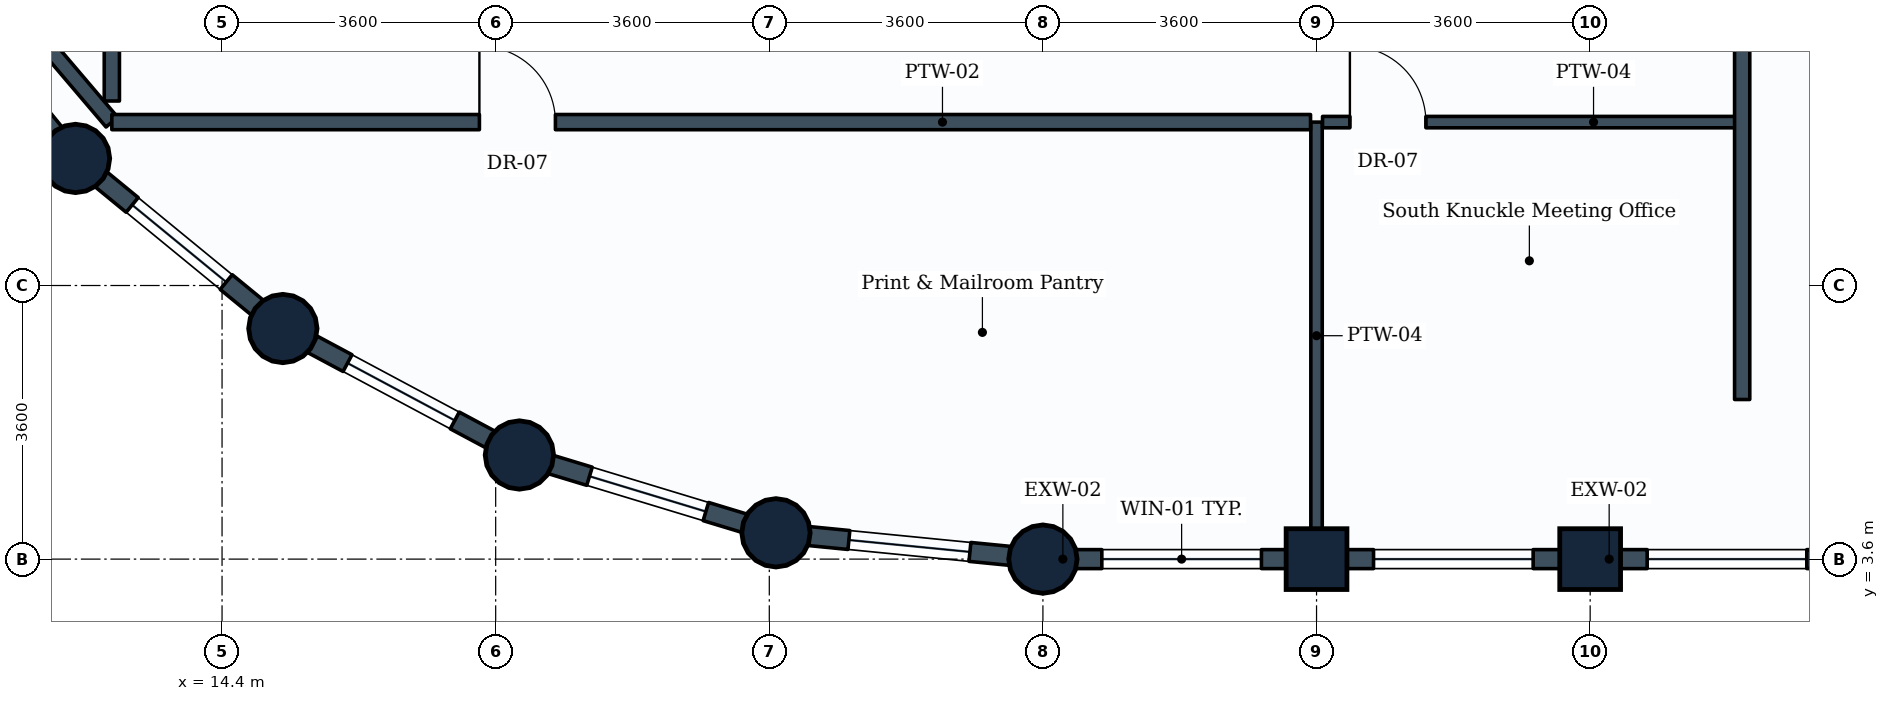
"""IFC4 building model, lengths in metres.
Left out: names, types, materials, properties, quantities, classifications, styles, units other than length and angle.
Written with IfcOpenShell. Run it as: python <this file> out.ifc"""

import sys

from ifc_helpers import new_model, si_unit, direction, frame, frame_2d, origin, origin_2d, place, context, subcontext, project, spatial, rectangle, circle, extrude, element, fill, save


model = new_model("IFC4")
c1 = context("Model", 3, precision=1e-05, world=origin(), true_north=direction((0.0, 1.0)))
c2 = subcontext(c1, "Body", "Model", "MODEL_VIEW")
j1 = project(units=[si_unit("LENGTHUNIT", "METRE"), si_unit("PLANEANGLEUNIT", "RADIAN")], contexts=[c1])
p1 = place(None, origin())
s1 = spatial("IfcSite", under=j1, at=p1, CompositionType="ELEMENT")
p2 = place(p1, origin())
s2 = spatial("IfcBuilding", under=s1, at=p2, CompositionType="ELEMENT")
p3 = place(p2, frame((0.0, 0.0, 270.2)))
s3 = spatial("IfcBuildingStorey", under=s2, at=p3, CompositionType="ELEMENT", Elevation=270.2)
for number, where, z_axis, x_axis in (
    (1, (12.472, 8.872, 0.0), (0.0, 0.0, 1.0), (1.0, 0.0, 0.0)),
    (2, (15.2, 6.634, 0.0), (0.0, 0.0, 1.0), (1.0, 0.0, 0.0)),
    (3, (18.312, 4.97, 0.0), (0.0, 0.0, 1.0), (1.0, 0.0, 0.0)),
    (4, (21.688, 3.946, 0.0), (0.0, 0.0, 1.0), (1.0, 0.0, 0.0)),
    (5, (25.2, 3.6, 0.0), (0.0, 0.0, 1.0), (1.0, 0.0, 0.0)),
):
    element("IfcColumn", number, at=place(p3, frame(where, z_axis=z_axis, x_axis=x_axis)), inside=s3, PredefinedType="COLUMN", context=c2, shape_type="SweptSolid", body=[
        extrude(circle(Radius=0.45, at=origin_2d()), origin(), (0.0, 0.0, 1.0), 3.6),
    ])
for number, where, z_axis, x_axis in (
    (6, (28.8, 3.6, 0.0), (0.0, 0.0, 1.0), (1.0, 0.0, 0.0)),
    (7, (32.4, 3.6, 0.0), (0.0, 0.0, 1.0), (1.0, 0.0, 0.0)),
):
    element("IfcColumn", number, at=place(p3, frame(where, z_axis=z_axis, x_axis=x_axis)), inside=s3, PredefinedType="COLUMN", context=c2, shape_type="SweptSolid", body=[
        extrude(rectangle(XDim=0.8, YDim=0.8, at=origin_2d()), origin(), (0.0, 0.0, 1.0), 3.6),
    ])
p4 = place(p3, frame((28.8, 3.6, 0.0), z_axis=(0.0, 0.0, 1.0), x_axis=(-1.0, 0.0, 0.0)))
e8 = element("IfcWall", 8, at=p4, inside=s3, PredefinedType="STANDARD", context=c2, shape_type="SweptSolid", body=[
    extrude(rectangle(XDim=3.6, YDim=0.25, at=frame_2d((1.8, 0.0))), origin(), (0.0, 0.0, 1.0), 2.83),
])
p5 = place(p4, frame((0.725, 0.0, 0.85)))
e9 = element("IfcOpeningElement", 9, at=p5, cuts=e8, PredefinedType="OPENING", context=c2, shape_type="SweptSolid", body=[
    extrude(rectangle(XDim=2.1, YDim=1.35, at=frame_2d((1.05, 0.675))), frame((0.0, 0.135, 0.0), z_axis=(0.0, -1.0, 0.0), x_axis=(1.0, 0.0, 0.0)), (0.0, 0.0, 1.0), 0.27),
])
p6 = place(p3, frame((32.4, 3.6, 0.0), z_axis=(0.0, 0.0, 1.0), x_axis=(-1.0, 0.0, 0.0)))
e10 = element("IfcWall", 10, at=p6, inside=s3, PredefinedType="STANDARD", context=c2, shape_type="SweptSolid", body=[
    extrude(rectangle(XDim=3.6, YDim=0.25, at=frame_2d((1.8, 0.0))), origin(), (0.0, 0.0, 1.0), 2.83),
])
p7 = place(p6, frame((0.75, 0.0, 0.85)))
e11 = element("IfcOpeningElement", 11, at=p7, cuts=e10, PredefinedType="OPENING", context=c2, shape_type="SweptSolid", body=[
    extrude(rectangle(XDim=2.1, YDim=1.35, at=frame_2d((1.05, 0.675))), frame((0.0, 0.135, 0.0), z_axis=(0.0, -1.0, 0.0), x_axis=(1.0, 0.0, 0.0)), (0.0, 0.0, 1.0), 0.27),
])
p8 = place(p3, frame((36.0, 3.6, 0.0), z_axis=(0.0, 0.0, 1.0), x_axis=(-1.0, 0.0, 0.0)))
e12 = element("IfcWall", 12, at=p8, inside=s3, PredefinedType="STANDARD", context=c2, shape_type="SweptSolid", body=[
    extrude(rectangle(XDim=3.6, YDim=0.25, at=frame_2d((1.8, 0.0))), origin(), (0.0, 0.0, 1.0), 2.83),
])
p9 = place(p8, frame((0.75, 0.0, 0.85)))
e13 = element("IfcOpeningElement", 13, at=p9, cuts=e12, PredefinedType="OPENING", context=c2, shape_type="SweptSolid", body=[
    extrude(rectangle(XDim=2.1, YDim=1.35, at=frame_2d((1.05, 0.675))), frame((0.0, 0.135, 0.0), z_axis=(0.0, -1.0, 0.0), x_axis=(1.0, 0.0, 0.0)), (0.0, 0.0, 1.0), 0.27),
])
p10 = place(p3, frame((12.472, 8.872, 0.0), z_axis=(0.0, 0.0, 1.0), x_axis=(-0.634258295121, 0.773121216285, 0.0)))
e14 = element("IfcWall", 14, at=p10, inside=s3, PredefinedType="STANDARD", context=c2, shape_type="SweptSolid", body=[
    extrude(rectangle(XDim=3.529, YDim=0.25, at=frame_2d((1.764, 0.0))), origin(), (0.0, 0.0, 1.0), 2.83),
])
p11 = place(p10, frame((0.964, 0.0, 0.85)))
e15 = element("IfcOpeningElement", 15, at=p11, cuts=e14, PredefinedType="OPENING", context=c2, shape_type="SweptSolid", body=[
    extrude(rectangle(XDim=1.6, YDim=1.35, at=frame_2d((0.8, 0.675))), frame((0.0, 0.135, 0.0), z_axis=(0.0, -1.0, 0.0), x_axis=(1.0, 0.0, 0.0)), (0.0, 0.0, 1.0), 0.27),
])
p12 = place(p3, frame((15.2, 6.634, 0.0), z_axis=(0.0, 0.0, 1.0), x_axis=(-0.773121216285, 0.634258295121, 0.0)))
e16 = element("IfcWall", 16, at=p12, inside=s3, PredefinedType="STANDARD", context=c2, shape_type="SweptSolid", body=[
    extrude(rectangle(XDim=3.529, YDim=0.25, at=frame_2d((1.764, 0.0))), origin(), (0.0, 0.0, 1.0), 2.83),
])
p13 = place(p12, frame((0.964, 0.0, 0.85)))
e17 = element("IfcOpeningElement", 17, at=p13, cuts=e16, PredefinedType="OPENING", context=c2, shape_type="SweptSolid", body=[
    extrude(rectangle(XDim=1.6, YDim=1.35, at=frame_2d((0.8, 0.675))), frame((0.0, 0.135, 0.0), z_axis=(0.0, -1.0, 0.0), x_axis=(1.0, 0.0, 0.0)), (0.0, 0.0, 1.0), 0.27),
])
p14 = place(p3, frame((18.312, 4.97, 0.0), z_axis=(0.0, 0.0, 1.0), x_axis=(-0.881846862014, 0.471535907389, 0.0)))
e18 = element("IfcWall", 18, at=p14, inside=s3, PredefinedType="STANDARD", context=c2, shape_type="SweptSolid", body=[
    extrude(rectangle(XDim=3.529, YDim=0.25, at=frame_2d((1.765, 0.0))), origin(), (0.0, 0.0, 1.0), 2.83),
])
p15 = place(p14, frame((0.964, 0.0, 0.85)))
e19 = element("IfcOpeningElement", 19, at=p15, cuts=e18, PredefinedType="OPENING", context=c2, shape_type="SweptSolid", body=[
    extrude(rectangle(XDim=1.6, YDim=1.35, at=frame_2d((0.8, 0.675))), frame((0.0, 0.135, 0.0), z_axis=(0.0, -1.0, 0.0), x_axis=(1.0, 0.0, 0.0)), (0.0, 0.0, 1.0), 0.27),
])
p16 = place(p3, frame((21.688, 3.946, 0.0), z_axis=(0.0, 0.0, 1.0), x_axis=(-0.956953367403, 0.290241714123, 0.0)))
e20 = element("IfcWall", 20, at=p16, inside=s3, PredefinedType="STANDARD", context=c2, shape_type="SweptSolid", body=[
    extrude(rectangle(XDim=3.528, YDim=0.25, at=frame_2d((1.764, 0.0))), origin(), (0.0, 0.0, 1.0), 2.83),
])
p17 = place(p16, frame((0.964, 0.0, 0.85)))
e21 = element("IfcOpeningElement", 21, at=p17, cuts=e20, PredefinedType="OPENING", context=c2, shape_type="SweptSolid", body=[
    extrude(rectangle(XDim=1.6, YDim=1.35, at=frame_2d((0.8, 0.675))), frame((0.0, 0.135, 0.0), z_axis=(0.0, -1.0, 0.0), x_axis=(1.0, 0.0, 0.0)), (0.0, 0.0, 1.0), 0.27),
])
p18 = place(p3, frame((25.2, 3.6, 0.0), z_axis=(0.0, 0.0, 1.0), x_axis=(-0.995183369056, 0.098030923459, 0.0)))
e22 = element("IfcWall", 22, at=p18, inside=s3, PredefinedType="STANDARD", context=c2, shape_type="SweptSolid", body=[
    extrude(rectangle(XDim=3.529, YDim=0.25, at=frame_2d((1.765, 0.0))), origin(), (0.0, 0.0, 1.0), 2.83),
])
p19 = place(p18, frame((0.965, 0.0, 0.85)))
e23 = element("IfcOpeningElement", 23, at=p19, cuts=e22, PredefinedType="OPENING", context=c2, shape_type="SweptSolid", body=[
    extrude(rectangle(XDim=1.6, YDim=1.35, at=frame_2d((0.8, 0.675))), frame((0.0, 0.135, 0.0), z_axis=(0.0, -1.0, 0.0), x_axis=(1.0, 0.0, 0.0)), (0.0, 0.0, 1.0), 0.27),
])
p20 = place(p3, frame((28.8, 9.35, 0.0), z_axis=(0.0, 0.0, 1.0), x_axis=(0.0, -1.0, 0.0)))
e24 = element("IfcWall", 24, at=p20, inside=s3, PredefinedType="PARTITIONING", context=c2, shape_type="SweptSolid", body=[
    extrude(rectangle(XDim=5.621, YDim=0.15, at=frame_2d((2.811, 0.0))), origin(), (0.0, 0.0, 1.0), 3.335),
])
p21 = place(p3, frame((12.95, 9.35, 0.0), z_axis=(0.0, 0.0, 1.0), x_axis=(-0.648016103597, 0.761626633908, 0.0)))
e25 = element("IfcWall", 25, at=p21, inside=s3, PredefinedType="PARTITIONING", context=c2, shape_type="SweptSolid", body=[
    extrude(rectangle(XDim=5.319, YDim=0.2, at=frame_2d((2.659, 0.0))), origin(), (0.0, 0.0, 1.0), 2.83),
])
p22 = place(p3, frame((12.95, 9.628, 0.0), z_axis=(0.0, 0.0, 1.0), x_axis=(0.0, 1.0, 0.0)))
e26 = element("IfcWall", 26, at=p22, inside=s3, PredefinedType="PARTITIONING", context=c2, shape_type="SweptSolid", body=[
    extrude(rectangle(XDim=6.868, YDim=0.2, at=frame_2d((3.434, 0.0))), origin(), (0.0, 0.0, 1.0), 3.03),
])
p23 = place(p22, frame((3.953, 0.0, 0.0)))
e27 = element("IfcOpeningElement", 27, at=p23, cuts=e26, PredefinedType="OPENING", context=c2, shape_type="SweptSolid", body=[
    extrude(rectangle(XDim=1.0, YDim=2.1, at=frame_2d((0.5, 1.05))), frame((0.0, 0.11, 0.0), z_axis=(0.0, -1.0, 0.0), x_axis=(1.0, 0.0, 0.0)), (0.0, 0.0, 1.0), 0.22),
])
p24 = place(p3, frame((12.95, 9.35, 0.0), z_axis=(0.0, 0.0, 1.0), x_axis=(1.0, 0.0, 0.0)))
e28 = element("IfcWall", 28, at=p24, inside=s3, PredefinedType="PARTITIONING", context=c2, shape_type="SweptSolid", body=[
    extrude(rectangle(XDim=15.771, YDim=0.2, at=frame_2d((7.885, 0.0))), origin(), (0.0, 0.0, 1.0), 3.02),
])
p25 = place(p24, frame((4.836, 0.0, 0.0)))
e29 = element("IfcOpeningElement", 29, at=p25, cuts=e28, PredefinedType="OPENING", context=c2, shape_type="SweptSolid", body=[
    extrude(rectangle(XDim=1.0, YDim=2.1, at=frame_2d((0.5, 1.05))), frame((0.0, 0.11, 0.0), z_axis=(0.0, -1.0, 0.0), x_axis=(1.0, 0.0, 0.0)), (0.0, 0.0, 1.0), 0.22),
])
p26 = place(p3, frame((28.879, 9.35, 0.0), z_axis=(0.0, 0.0, 1.0), x_axis=(1.0, 0.0, 0.0)))
e30 = element("IfcWall", 30, at=p26, inside=s3, PredefinedType="PARTITIONING", context=c2, shape_type="SweptSolid", body=[
    extrude(rectangle(XDim=5.521, YDim=0.15, at=frame_2d((2.76, 0.0))), origin(), (0.0, 0.0, 1.0), 3.335),
])
p27 = place(p26, frame((0.36, 0.0, 0.0)))
e31 = element("IfcOpeningElement", 31, at=p27, cuts=e30, PredefinedType="OPENING", context=c2, shape_type="SweptSolid", body=[
    extrude(rectangle(XDim=1.0, YDim=2.1, at=frame_2d((0.5, 1.05))), frame((0.0, 0.085, 0.0), z_axis=(0.0, -1.0, 0.0), x_axis=(1.0, 0.0, 0.0)), (0.0, 0.0, 1.0), 0.17),
])
p28 = place(p3, frame((34.4, 5.7, 0.0), z_axis=(0.0, 0.0, 1.0), x_axis=(0.0, 1.0, 0.0)))
e32 = element("IfcWall", 32, at=p28, inside=s3, PredefinedType="PARTITIONING", context=c2, shape_type="SweptSolid", body=[
    extrude(rectangle(XDim=12.15, YDim=0.2, at=frame_2d((6.075, 0.0))), origin(), (0.0, 0.0, 1.0), 3.03),
])
p29 = place(p5, origin())
e33 = element("IfcWindow", 33, at=p29, inside=s3, PartitioningType="SINGLE_PANEL", PredefinedType="WINDOW", context=c2, shape_type="SweptSolid", body=[
    extrude(rectangle(XDim=2.1, YDim=1.35, at=frame_2d((1.05, 0.675))), frame((0.0, 0.03, 0.0), z_axis=(0.0, -1.0, 0.0), x_axis=(1.0, 0.0, 0.0)), (0.0, 0.0, 1.0), 0.06),
])
fill(e9, e33)
p30 = place(p7, origin())
e34 = element("IfcWindow", 34, at=p30, inside=s3, PartitioningType="SINGLE_PANEL", PredefinedType="WINDOW", context=c2, shape_type="SweptSolid", body=[
    extrude(rectangle(XDim=2.1, YDim=1.35, at=frame_2d((1.05, 0.675))), frame((0.0, 0.03, 0.0), z_axis=(0.0, -1.0, 0.0), x_axis=(1.0, 0.0, 0.0)), (0.0, 0.0, 1.0), 0.06),
])
fill(e11, e34)
p31 = place(p9, origin())
e35 = element("IfcWindow", 35, at=p31, inside=s3, PartitioningType="SINGLE_PANEL", PredefinedType="WINDOW", context=c2, shape_type="SweptSolid", body=[
    extrude(rectangle(XDim=2.1, YDim=1.35, at=frame_2d((1.05, 0.675))), frame((0.0, 0.03, 0.0), z_axis=(0.0, -1.0, 0.0), x_axis=(1.0, 0.0, 0.0)), (0.0, 0.0, 1.0), 0.06),
])
fill(e13, e35)
p32 = place(p13, origin())
e36 = element("IfcWindow", 36, at=p32, inside=s3, PartitioningType="SINGLE_PANEL", PredefinedType="WINDOW", context=c2, shape_type="SweptSolid", body=[
    extrude(rectangle(XDim=1.6, YDim=1.35, at=frame_2d((0.8, 0.675))), frame((0.0, 0.03, 0.0), z_axis=(0.0, -1.0, 0.0), x_axis=(1.0, 0.0, 0.0)), (0.0, 0.0, 1.0), 0.06),
])
fill(e17, e36)
p33 = place(p15, origin())
e37 = element("IfcWindow", 37, at=p33, inside=s3, PartitioningType="SINGLE_PANEL", PredefinedType="WINDOW", context=c2, shape_type="SweptSolid", body=[
    extrude(rectangle(XDim=1.6, YDim=1.35, at=frame_2d((0.8, 0.675))), frame((0.0, 0.03, 0.0), z_axis=(0.0, -1.0, 0.0), x_axis=(1.0, 0.0, 0.0)), (0.0, 0.0, 1.0), 0.06),
])
fill(e19, e37)
p34 = place(p17, origin())
e38 = element("IfcWindow", 38, at=p34, inside=s3, PartitioningType="SINGLE_PANEL", PredefinedType="WINDOW", context=c2, shape_type="SweptSolid", body=[
    extrude(rectangle(XDim=1.6, YDim=1.35, at=frame_2d((0.8, 0.675))), frame((0.0, 0.03, 0.0), z_axis=(0.0, -1.0, 0.0), x_axis=(1.0, 0.0, 0.0)), (0.0, 0.0, 1.0), 0.06),
])
fill(e21, e38)
p35 = place(p19, origin())
e39 = element("IfcWindow", 39, at=p35, inside=s3, PartitioningType="SINGLE_PANEL", PredefinedType="WINDOW", context=c2, shape_type="SweptSolid", body=[
    extrude(rectangle(XDim=1.6, YDim=1.35, at=frame_2d((0.8, 0.675))), frame((0.0, 0.03, 0.0), z_axis=(0.0, -1.0, 0.0), x_axis=(1.0, 0.0, 0.0)), (0.0, 0.0, 1.0), 0.06),
])
fill(e23, e39)
p36 = place(p25, origin())
e40 = element("IfcDoor", 40, at=p36, inside=s3, OperationType="SINGLE_SWING_LEFT", PredefinedType="DOOR", context=c2, shape_type="SweptSolid", body=[
    extrude(rectangle(XDim=1.0, YDim=2.1, at=frame_2d((0.5, 1.05))), frame((0.0, 0.025, 0.0), z_axis=(0.0, -1.0, 0.0), x_axis=(1.0, 0.0, 0.0)), (0.0, 0.0, 1.0), 0.05),
])
fill(e29, e40)
p37 = place(p27, origin())
e41 = element("IfcDoor", 41, at=p37, inside=s3, OperationType="SINGLE_SWING_LEFT", PredefinedType="DOOR", context=c2, shape_type="SweptSolid", body=[
    extrude(rectangle(XDim=1.0, YDim=2.1, at=frame_2d((0.5, 1.05))), frame((0.0, 0.025, 0.0), z_axis=(0.0, -1.0, 0.0), x_axis=(1.0, 0.0, 0.0)), (0.0, 0.0, 1.0), 0.05),
])
fill(e31, e41)
save(model, sys.argv[1])
